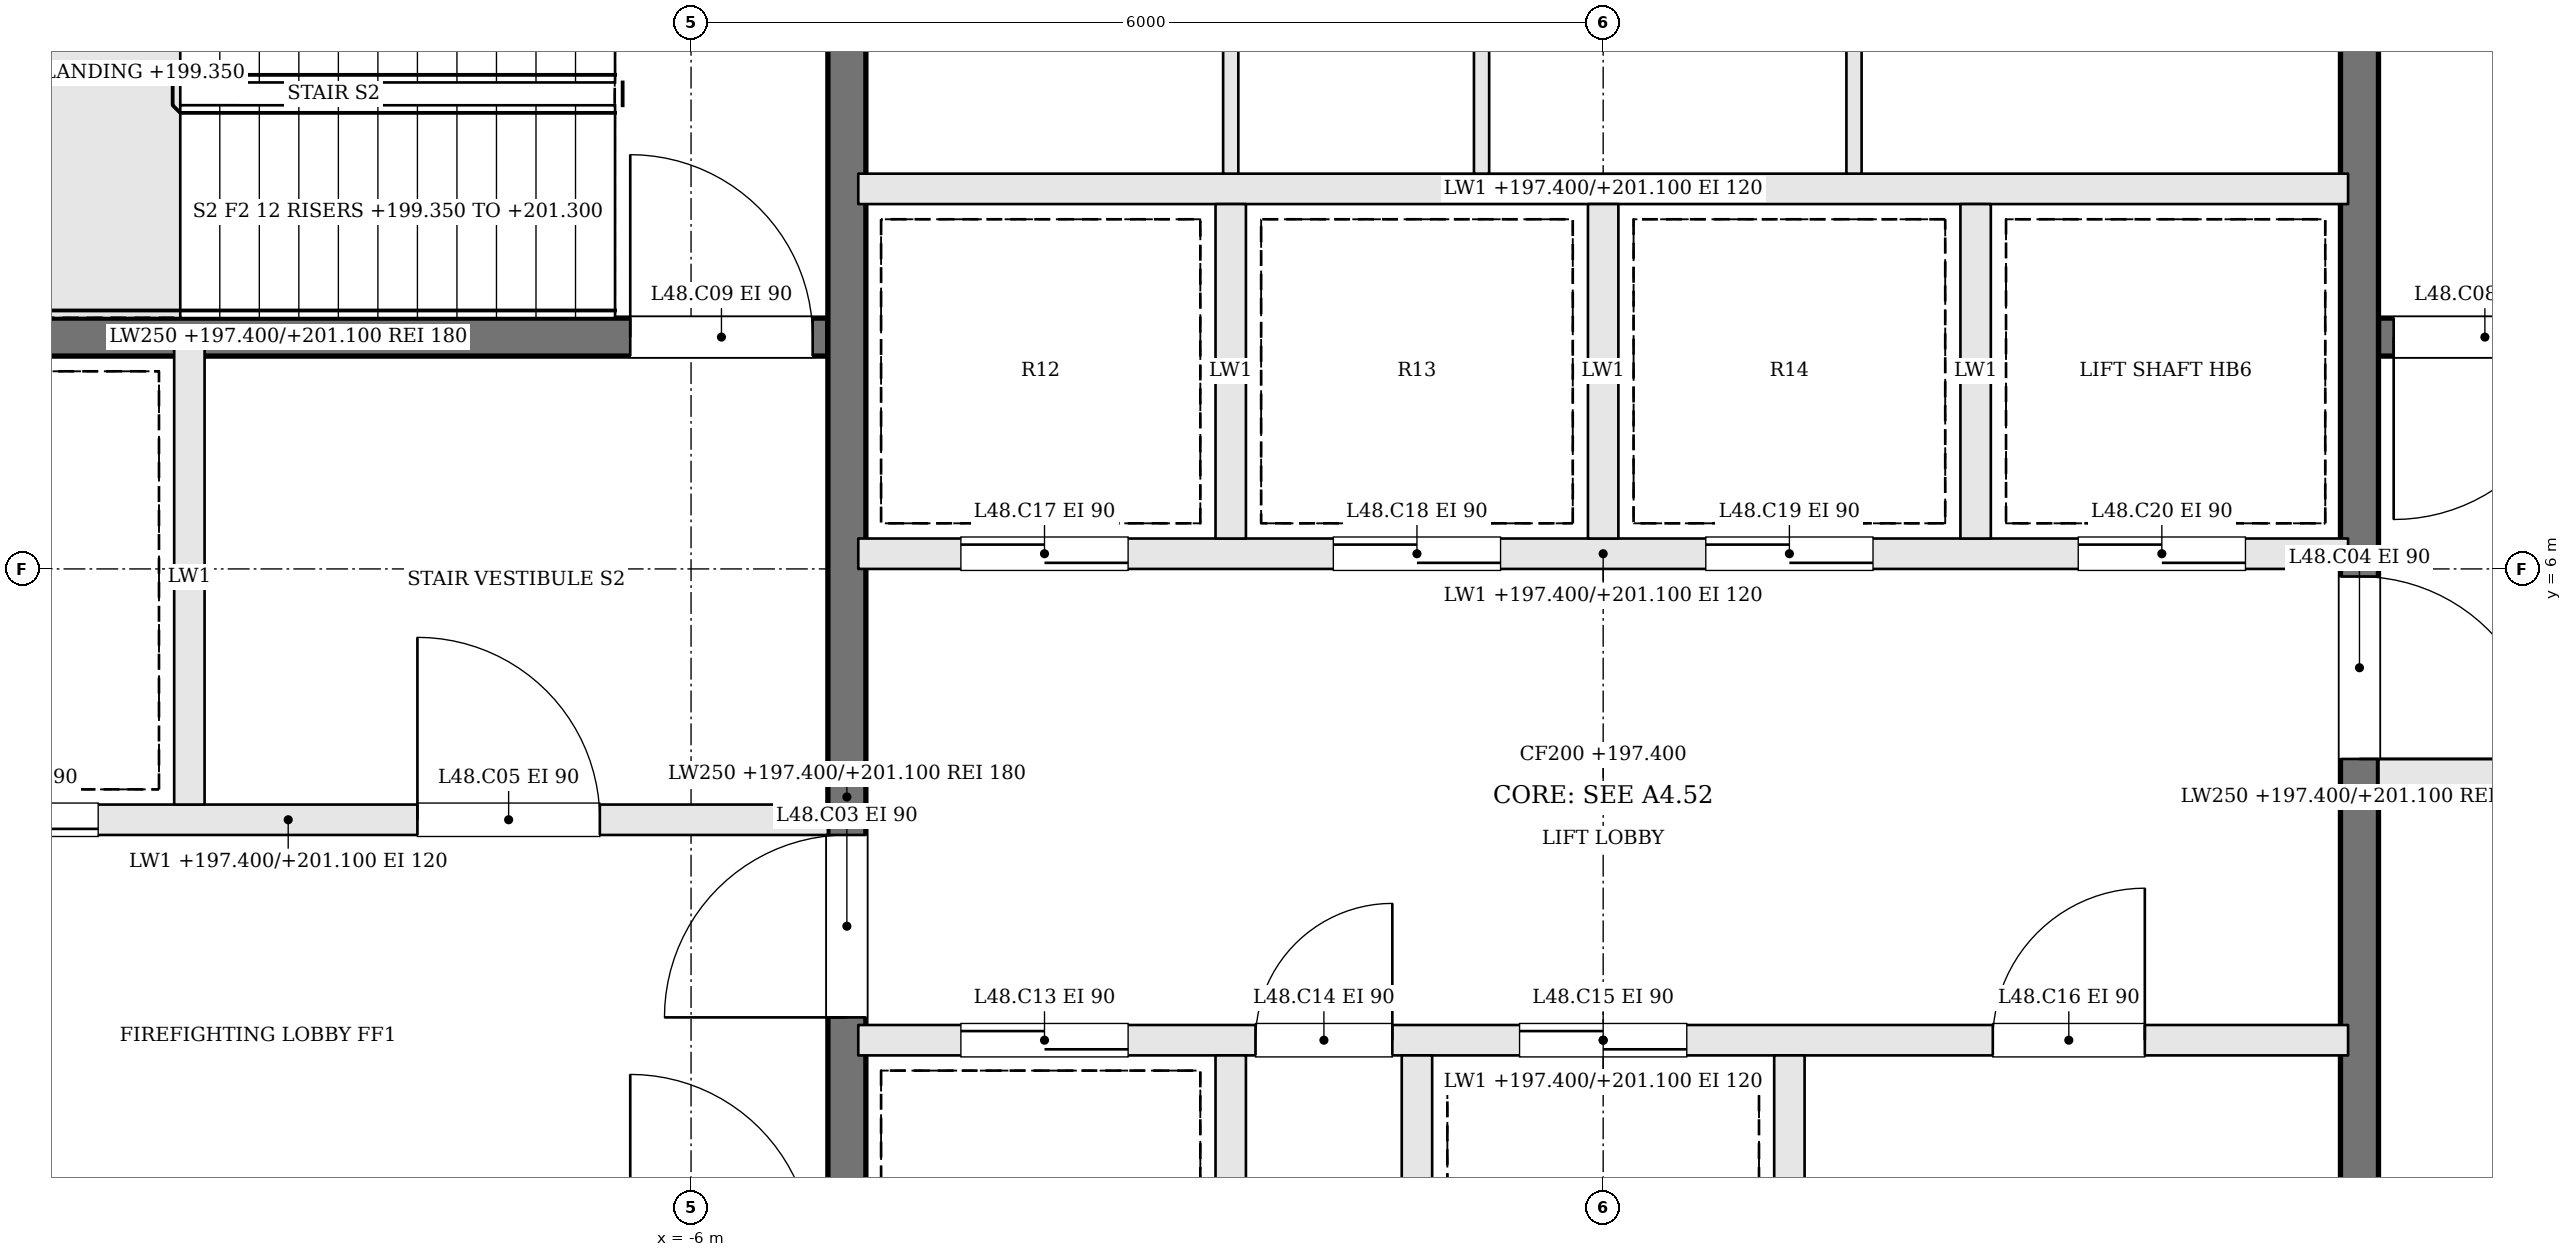
"""IFC4 building model, lengths in metres.
Left out: names, types, materials, properties, quantities, classifications, styles, units other than length and angle.
Written with IfcOpenShell. Run it as: python <this file> out.ifc"""

import sys

from ifc_helpers import new_model, si_unit, direction, frame, frame_2d, origin, place, context, subcontext, project, spatial, rectangle, extrude, element, fill, save


model = new_model("IFC4")
c1 = context("Model", 3, precision=1e-05, world=origin(), true_north=direction((0.0, 1.0)))
c2 = subcontext(c1, "Body", "Model", "MODEL_VIEW")
j1 = project(units=[si_unit("LENGTHUNIT", "METRE"), si_unit("PLANEANGLEUNIT", "RADIAN")], contexts=[c1])
p1 = place(None, origin())
s1 = spatial("IfcSite", under=j1, at=p1, CompositionType="ELEMENT")
p2 = place(p1, origin())
s2 = spatial("IfcBuilding", under=s1, at=p2, CompositionType="ELEMENT")
p3 = place(p2, frame((0.0, 0.0, 197.4)))
s3 = spatial("IfcBuildingStorey", under=s2, at=p3, CompositionType="ELEMENT", Elevation=197.4)
p4 = place(p3, frame((12.2, 7.525, 0.0), z_axis=(0.0, 0.0, 1.0), x_axis=(-1.0, 0.0, 0.0)))
e1 = element("IfcWall", 1, at=p4, inside=s3, PredefinedType="SOLIDWALL", context=c2, shape_type="SweptSolid", body=[
    extrude(rectangle(XDim=7.1, YDim=0.25, at=frame_2d((3.55, 0.0))), origin(), (0.0, 0.0, 1.0), 3.7),
])
p5 = place(p4, frame((5.8, 0.0, 0.0)))
e2 = element("IfcOpeningElement", 2, at=p5, cuts=e1, PredefinedType="OPENING", context=c2, shape_type="SweptSolid", body=[
    extrude(rectangle(XDim=1.2, YDim=2.1, at=frame_2d((0.6, 1.05))), frame((0.0, 0.135, 0.0), z_axis=(0.0, -1.0, 0.0), x_axis=(1.0, 0.0, 0.0)), (0.0, 0.0, 1.0), 0.27),
])
p6 = place(p3, frame((-12.2, 4.35, 0.0), z_axis=(0.0, 0.0, 1.0), x_axis=(1.0, 0.0, 0.0)))
e3 = element("IfcWall", 3, at=p6, inside=s3, PredefinedType="SOLIDWALL", context=c2, shape_type="SweptSolid", body=[
    extrude(rectangle(XDim=7.1, YDim=0.2, at=frame_2d((3.55, 0.0))), origin(), (0.0, 0.0, 1.0), 3.7),
])
p7 = place(p6, frame((4.4, 0.0, 0.0)))
e4 = element("IfcOpeningElement", 4, at=p7, cuts=e3, PredefinedType="OPENING", context=c2, shape_type="SweptSolid", body=[
    extrude(rectangle(XDim=1.2, YDim=2.1, at=frame_2d((0.6, 1.05))), frame((0.0, 0.11, 0.0), z_axis=(0.0, -1.0, 0.0), x_axis=(1.0, 0.0, 0.0)), (0.0, 0.0, 1.0), 0.22),
])
p8 = place(p6, frame((1.1, 0.0, 0.0)))
e5 = element("IfcOpeningElement", 5, at=p8, cuts=e3, PredefinedType="OPENING", context=c2, shape_type="SweptSolid", body=[
    extrude(rectangle(XDim=1.2, YDim=2.1, at=frame_2d((0.6, 1.05))), frame((0.0, 0.11, 0.0), z_axis=(0.0, -1.0, 0.0), x_axis=(1.0, 0.0, 0.0)), (0.0, 0.0, 1.0), 0.22),
])
p9 = place(p3, frame((12.2, 4.65, 0.0), z_axis=(0.0, 0.0, 1.0), x_axis=(-1.0, 0.0, 0.0)))
e6 = element("IfcWall", 6, at=p9, inside=s3, PredefinedType="SOLIDWALL", context=c2, shape_type="SweptSolid", body=[
    extrude(rectangle(XDim=7.1, YDim=0.2, at=frame_2d((3.55, 0.0))), origin(), (0.0, 0.0, 1.0), 3.7),
])
p10 = place(p9, frame((4.4, 0.0, 0.0)))
e7 = element("IfcOpeningElement", 7, at=p10, cuts=e6, PredefinedType="OPENING", context=c2, shape_type="SweptSolid", body=[
    extrude(rectangle(XDim=1.2, YDim=2.1, at=frame_2d((0.6, 1.05))), frame((0.0, 0.11, 0.0), z_axis=(0.0, -1.0, 0.0), x_axis=(1.0, 0.0, 0.0)), (0.0, 0.0, 1.0), 0.22),
])
p11 = place(p9, frame((1.1, 0.0, 0.0)))
e8 = element("IfcOpeningElement", 8, at=p11, cuts=e6, PredefinedType="OPENING", context=c2, shape_type="SweptSolid", body=[
    extrude(rectangle(XDim=1.2, YDim=2.1, at=frame_2d((0.6, 1.05))), frame((0.0, 0.11, 0.0), z_axis=(0.0, -1.0, 0.0), x_axis=(1.0, 0.0, 0.0)), (0.0, 0.0, 1.0), 0.22),
])
p12 = place(p3, frame((-12.2, 7.525, 0.0), z_axis=(0.0, 0.0, 1.0), x_axis=(1.0, 0.0, 0.0)))
e9 = element("IfcWall", 9, at=p12, inside=s3, PredefinedType="SOLIDWALL", context=c2, shape_type="SweptSolid", body=[
    extrude(rectangle(XDim=7.1, YDim=0.25, at=frame_2d((3.55, 0.0))), origin(), (0.0, 0.0, 1.0), 3.7),
])
p13 = place(p12, frame((5.8, 0.0, 0.0)))
e10 = element("IfcOpeningElement", 10, at=p13, cuts=e9, PredefinedType="OPENING", context=c2, shape_type="SweptSolid", body=[
    extrude(rectangle(XDim=1.2, YDim=2.1, at=frame_2d((0.6, 1.05))), frame((0.0, 0.135, 0.0), z_axis=(0.0, -1.0, 0.0), x_axis=(1.0, 0.0, 0.0)), (0.0, 0.0, 1.0), 0.27),
])
p14 = place(p3, frame((-9.3, 4.45, 0.0), z_axis=(0.0, 0.0, 1.0), x_axis=(0.0, 1.0, 0.0)))
e11 = element("IfcWall", 11, at=p14, inside=s3, PredefinedType="SOLIDWALL", context=c2, shape_type="SweptSolid", body=[
    extrude(rectangle(XDim=3.0, YDim=0.2, at=frame_2d((1.5, 0.0))), origin(), (0.0, 0.0, 1.0), 3.7),
])
p15 = place(p3, frame((-4.975, -2.2, 0.0), z_axis=(0.0, 0.0, 1.0), x_axis=(0.0, 1.0, 0.0)))
e12 = element("IfcWall", 12, at=p15, inside=s3, PredefinedType="SOLIDWALL", context=c2, shape_type="SweptSolid", body=[
    extrude(rectangle(XDim=13.4, YDim=0.25, at=frame_2d((6.7, 0.0))), origin(), (0.0, 0.0, 1.0), 3.7),
])
p16 = place(p15, frame((5.25, 0.0, 0.0)))
e13 = element("IfcOpeningElement", 13, at=p16, cuts=e12, PredefinedType="OPENING", context=c2, shape_type="SweptSolid", body=[
    extrude(rectangle(XDim=1.2, YDim=2.1, at=frame_2d((0.6, 1.05))), frame((0.0, 0.135, 0.0), z_axis=(0.0, -1.0, 0.0), x_axis=(1.0, 0.0, 0.0)), (0.0, 0.0, 1.0), 0.27),
])
p17 = place(p3, frame((4.975, 11.2, 0.0), z_axis=(0.0, 0.0, 1.0), x_axis=(0.0, -1.0, 0.0)))
e14 = element("IfcWall", 14, at=p17, inside=s3, PredefinedType="SOLIDWALL", context=c2, shape_type="SweptSolid", body=[
    extrude(rectangle(XDim=13.4, YDim=0.25, at=frame_2d((6.7, 0.0))), origin(), (0.0, 0.0, 1.0), 3.7),
])
p18 = place(p17, frame((5.25, 0.0, 0.0)))
e15 = element("IfcOpeningElement", 15, at=p18, cuts=e14, PredefinedType="OPENING", context=c2, shape_type="SweptSolid", body=[
    extrude(rectangle(XDim=1.2, YDim=2.1, at=frame_2d((0.6, 1.05))), frame((0.0, 0.135, 0.0), z_axis=(0.0, -1.0, 0.0), x_axis=(1.0, 0.0, 0.0)), (0.0, 0.0, 1.0), 0.27),
])
p19 = place(p3, frame((-4.9, 2.9, 0.0), z_axis=(0.0, 0.0, 1.0), x_axis=(1.0, 0.0, 0.0)))
e16 = element("IfcWall", 16, at=p19, inside=s3, PredefinedType="SOLIDWALL", context=c2, shape_type="SweptSolid", body=[
    extrude(rectangle(XDim=9.8, YDim=0.2, at=frame_2d((4.9, 0.0))), origin(), (0.0, 0.0, 1.0), 3.7),
])
p20 = place(p19, frame((0.675, 0.0, 0.0)))
e17 = element("IfcOpeningElement", 17, at=p20, cuts=e16, PredefinedType="OPENING", context=c2, shape_type="SweptSolid", body=[
    extrude(rectangle(XDim=1.1, YDim=2.1, at=frame_2d((0.55, 1.05))), frame((0.0, 0.11, 0.0), z_axis=(0.0, -1.0, 0.0), x_axis=(1.0, 0.0, 0.0)), (0.0, 0.0, 1.0), 0.22),
])
p21 = place(p19, frame((2.613, 0.0, 0.0)))
e18 = element("IfcOpeningElement", 18, at=p21, cuts=e16, PredefinedType="OPENING", context=c2, shape_type="SweptSolid", body=[
    extrude(rectangle(XDim=0.9, YDim=2.1, at=frame_2d((0.45, 1.05))), frame((0.0, 0.11, 0.0), z_axis=(0.0, -1.0, 0.0), x_axis=(1.0, 0.0, 0.0)), (0.0, 0.0, 1.0), 0.22),
])
p22 = place(p19, frame((4.35, 0.0, 0.0)))
e19 = element("IfcOpeningElement", 19, at=p22, cuts=e16, PredefinedType="OPENING", context=c2, shape_type="SweptSolid", body=[
    extrude(rectangle(XDim=1.1, YDim=2.1, at=frame_2d((0.55, 1.05))), frame((0.0, 0.11, 0.0), z_axis=(0.0, -1.0, 0.0), x_axis=(1.0, 0.0, 0.0)), (0.0, 0.0, 1.0), 0.22),
])
p23 = place(p19, frame((7.463, 0.0, 0.0)))
e20 = element("IfcOpeningElement", 20, at=p23, cuts=e16, PredefinedType="OPENING", context=c2, shape_type="SweptSolid", body=[
    extrude(rectangle(XDim=1.0, YDim=2.1, at=frame_2d((0.5, 1.05))), frame((0.0, 0.11, 0.0), z_axis=(0.0, -1.0, 0.0), x_axis=(1.0, 0.0, 0.0)), (0.0, 0.0, 1.0), 0.22),
])
p24 = place(p3, frame((-4.9, 6.1, 0.0), z_axis=(0.0, 0.0, 1.0), x_axis=(1.0, 0.0, 0.0)))
e21 = element("IfcWall", 21, at=p24, inside=s3, PredefinedType="SOLIDWALL", context=c2, shape_type="SweptSolid", body=[
    extrude(rectangle(XDim=9.8, YDim=0.2, at=frame_2d((4.9, 0.0))), origin(), (0.0, 0.0, 1.0), 3.7),
])
p25 = place(p24, frame((0.675, 0.0, 0.0)))
e22 = element("IfcOpeningElement", 22, at=p25, cuts=e21, PredefinedType="OPENING", context=c2, shape_type="SweptSolid", body=[
    extrude(rectangle(XDim=1.1, YDim=2.1, at=frame_2d((0.55, 1.05))), frame((0.0, 0.11, 0.0), z_axis=(0.0, -1.0, 0.0), x_axis=(1.0, 0.0, 0.0)), (0.0, 0.0, 1.0), 0.22),
])
p26 = place(p24, frame((3.125, 0.0, 0.0)))
e23 = element("IfcOpeningElement", 23, at=p26, cuts=e21, PredefinedType="OPENING", context=c2, shape_type="SweptSolid", body=[
    extrude(rectangle(XDim=1.1, YDim=2.1, at=frame_2d((0.55, 1.05))), frame((0.0, 0.11, 0.0), z_axis=(0.0, -1.0, 0.0), x_axis=(1.0, 0.0, 0.0)), (0.0, 0.0, 1.0), 0.22),
])
p27 = place(p24, frame((5.575, 0.0, 0.0)))
e24 = element("IfcOpeningElement", 24, at=p27, cuts=e21, PredefinedType="OPENING", context=c2, shape_type="SweptSolid", body=[
    extrude(rectangle(XDim=1.1, YDim=2.1, at=frame_2d((0.55, 1.05))), frame((0.0, 0.11, 0.0), z_axis=(0.0, -1.0, 0.0), x_axis=(1.0, 0.0, 0.0)), (0.0, 0.0, 1.0), 0.22),
])
p28 = place(p24, frame((8.025, 0.0, 0.0)))
e25 = element("IfcOpeningElement", 25, at=p28, cuts=e21, PredefinedType="OPENING", context=c2, shape_type="SweptSolid", body=[
    extrude(rectangle(XDim=1.1, YDim=2.1, at=frame_2d((0.55, 1.05))), frame((0.0, 0.11, 0.0), z_axis=(0.0, -1.0, 0.0), x_axis=(1.0, 0.0, 0.0)), (0.0, 0.0, 1.0), 0.22),
])
p29 = place(p3, frame((-4.9, 8.5, 0.0), z_axis=(0.0, 0.0, 1.0), x_axis=(1.0, 0.0, 0.0)))
e26 = element("IfcWall", 26, at=p29, inside=s3, PredefinedType="SOLIDWALL", context=c2, shape_type="SweptSolid", body=[
    extrude(rectangle(XDim=9.8, YDim=0.2, at=frame_2d((4.9, 0.0))), origin(), (0.0, 0.0, 1.0), 3.7),
])
for number, where, z_axis, x_axis in (
    (27, (-2.45, 0.6, 0.0), (0.0, 0.0, 1.0), (0.0, 1.0, 0.0)),
    (28, (-1.225, 0.6, 0.0), (0.0, 0.0, 1.0), (0.0, 1.0, 0.0)),
    (29, (1.225, 0.6, 0.0), (0.0, 0.0, 1.0), (0.0, 1.0, 0.0)),
    (30, (-2.45, 6.2, 0.0), (0.0, 0.0, 1.0), (0.0, 1.0, 0.0)),
    (31, (0.0, 6.2, 0.0), (0.0, 0.0, 1.0), (0.0, 1.0, 0.0)),
    (32, (2.45, 6.2, 0.0), (0.0, 0.0, 1.0), (0.0, 1.0, 0.0)),
):
    element("IfcWall", number, at=place(p3, frame(where, z_axis=z_axis, x_axis=x_axis)), inside=s3, PredefinedType="SOLIDWALL", context=c2, shape_type="SweptSolid", body=[
        extrude(rectangle(XDim=2.2, YDim=0.2, at=frame_2d((1.1, 0.0))), origin(), (0.0, 0.0, 1.0), 3.7),
    ])
for number, where, z_axis, x_axis in (
    (33, (-2.45, 8.6, 0.0), (0.0, 0.0, 1.0), (0.0, 1.0, 0.0)),
    (34, (-0.8, 8.6, 0.0), (0.0, 0.0, 1.0), (0.0, 1.0, 0.0)),
    (35, (1.65, 8.6, 0.0), (0.0, 0.0, 1.0), (0.0, 1.0, 0.0)),
):
    element("IfcWall", number, at=place(p3, frame(where, z_axis=z_axis, x_axis=x_axis)), inside=s3, PredefinedType="PARTITIONING", context=c2, shape_type="SweptSolid", body=[
        extrude(rectangle(XDim=2.6, YDim=0.1, at=frame_2d((1.3, 0.0))), origin(), (0.0, 0.0, 1.0), 3.7),
    ])
p30 = place(p16, origin())
e36 = element("IfcDoor", 36, at=p30, inside=s3, OperationType="SINGLE_SWING_LEFT", PredefinedType="DOOR", context=c2, shape_type="SweptSolid", body=[
    extrude(rectangle(XDim=1.2, YDim=2.1, at=frame_2d((0.6, 1.05))), frame((0.0, 0.025, 0.0), z_axis=(0.0, -1.0, 0.0), x_axis=(1.0, 0.0, 0.0)), (0.0, 0.0, 1.0), 0.05),
])
fill(e13, e36)
p31 = place(p18, origin())
e37 = element("IfcDoor", 37, at=p31, inside=s3, OperationType="SINGLE_SWING_RIGHT", PredefinedType="DOOR", context=c2, shape_type="SweptSolid", body=[
    extrude(rectangle(XDim=1.2, YDim=2.1, at=frame_2d((0.6, 1.05))), frame((0.0, 0.025, 0.0), z_axis=(0.0, -1.0, 0.0), x_axis=(1.0, 0.0, 0.0)), (0.0, 0.0, 1.0), 0.05),
])
fill(e15, e37)
p32 = place(p7, origin())
e38 = element("IfcDoor", 38, at=p32, inside=s3, OperationType="SINGLE_SWING_LEFT", PredefinedType="DOOR", context=c2, shape_type="SweptSolid", body=[
    extrude(rectangle(XDim=1.2, YDim=2.1, at=frame_2d((0.6, 1.05))), frame((0.0, 0.025, 0.0), z_axis=(0.0, -1.0, 0.0), x_axis=(1.0, 0.0, 0.0)), (0.0, 0.0, 1.0), 0.05),
])
fill(e4, e38)
p33 = place(p5, origin())
e39 = element("IfcDoor", 39, at=p33, inside=s3, OperationType="SINGLE_SWING_RIGHT", PredefinedType="DOOR", context=c2, shape_type="SweptSolid", body=[
    extrude(rectangle(XDim=1.2, YDim=2.1, at=frame_2d((0.6, 1.05))), frame((0.0, 0.025, 0.0), z_axis=(0.0, -1.0, 0.0), x_axis=(1.0, 0.0, 0.0)), (0.0, 0.0, 1.0), 0.05),
])
fill(e2, e39)
p34 = place(p13, origin())
e40 = element("IfcDoor", 40, at=p34, inside=s3, OperationType="SINGLE_SWING_LEFT", PredefinedType="DOOR", context=c2, shape_type="SweptSolid", body=[
    extrude(rectangle(XDim=1.2, YDim=2.1, at=frame_2d((0.6, 1.05))), frame((0.0, 0.025, 0.0), z_axis=(0.0, -1.0, 0.0), x_axis=(1.0, 0.0, 0.0)), (0.0, 0.0, 1.0), 0.05),
])
fill(e10, e40)
p35 = place(p8, origin())
e41 = element("IfcDoor", 41, at=p35, inside=s3, OperationType="SLIDING_TO_RIGHT", PredefinedType="DOOR", context=c2, shape_type="SweptSolid", body=[
    extrude(rectangle(XDim=1.2, YDim=2.1, at=frame_2d((0.6, 1.05))), frame((0.0, 0.025, 0.0), z_axis=(0.0, -1.0, 0.0), x_axis=(1.0, 0.0, 0.0)), (0.0, 0.0, 1.0), 0.05),
])
fill(e5, e41)
p36 = place(p20, origin())
e42 = element("IfcDoor", 42, at=p36, inside=s3, OperationType="SLIDING_TO_RIGHT", PredefinedType="DOOR", context=c2, shape_type="SweptSolid", body=[
    extrude(rectangle(XDim=1.1, YDim=2.1, at=frame_2d((0.55, 1.05))), frame((0.0, 0.025, 0.0), z_axis=(0.0, -1.0, 0.0), x_axis=(1.0, 0.0, 0.0)), (0.0, 0.0, 1.0), 0.05),
])
fill(e17, e42)
p37 = place(p21, origin())
e43 = element("IfcDoor", 43, at=p37, inside=s3, OperationType="SINGLE_SWING_RIGHT", PredefinedType="DOOR", context=c2, shape_type="SweptSolid", body=[
    extrude(rectangle(XDim=0.9, YDim=2.1, at=frame_2d((0.45, 1.05))), frame((0.0, 0.025, 0.0), z_axis=(0.0, -1.0, 0.0), x_axis=(1.0, 0.0, 0.0)), (0.0, 0.0, 1.0), 0.05),
])
fill(e18, e43)
p38 = place(p22, origin())
e44 = element("IfcDoor", 44, at=p38, inside=s3, OperationType="SLIDING_TO_LEFT", PredefinedType="DOOR", context=c2, shape_type="SweptSolid", body=[
    extrude(rectangle(XDim=1.1, YDim=2.1, at=frame_2d((0.55, 1.05))), frame((0.0, 0.025, 0.0), z_axis=(0.0, -1.0, 0.0), x_axis=(1.0, 0.0, 0.0)), (0.0, 0.0, 1.0), 0.05),
])
fill(e19, e44)
p39 = place(p23, origin())
e45 = element("IfcDoor", 45, at=p39, inside=s3, OperationType="SINGLE_SWING_RIGHT", PredefinedType="DOOR", context=c2, shape_type="SweptSolid", body=[
    extrude(rectangle(XDim=1.0, YDim=2.1, at=frame_2d((0.5, 1.05))), frame((0.0, 0.025, 0.0), z_axis=(0.0, -1.0, 0.0), x_axis=(1.0, 0.0, 0.0)), (0.0, 0.0, 1.0), 0.05),
])
fill(e20, e45)
p40 = place(p25, origin())
e46 = element("IfcDoor", 46, at=p40, inside=s3, OperationType="SLIDING_TO_RIGHT", PredefinedType="DOOR", context=c2, shape_type="SweptSolid", body=[
    extrude(rectangle(XDim=1.1, YDim=2.1, at=frame_2d((0.55, 1.05))), frame((0.0, 0.025, 0.0), z_axis=(0.0, -1.0, 0.0), x_axis=(1.0, 0.0, 0.0)), (0.0, 0.0, 1.0), 0.05),
])
fill(e22, e46)
p41 = place(p26, origin())
e47 = element("IfcDoor", 47, at=p41, inside=s3, OperationType="SLIDING_TO_LEFT", PredefinedType="DOOR", context=c2, shape_type="SweptSolid", body=[
    extrude(rectangle(XDim=1.1, YDim=2.1, at=frame_2d((0.55, 1.05))), frame((0.0, 0.025, 0.0), z_axis=(0.0, -1.0, 0.0), x_axis=(1.0, 0.0, 0.0)), (0.0, 0.0, 1.0), 0.05),
])
fill(e23, e47)
p42 = place(p27, origin())
e48 = element("IfcDoor", 48, at=p42, inside=s3, OperationType="SLIDING_TO_RIGHT", PredefinedType="DOOR", context=c2, shape_type="SweptSolid", body=[
    extrude(rectangle(XDim=1.1, YDim=2.1, at=frame_2d((0.55, 1.05))), frame((0.0, 0.025, 0.0), z_axis=(0.0, -1.0, 0.0), x_axis=(1.0, 0.0, 0.0)), (0.0, 0.0, 1.0), 0.05),
])
fill(e24, e48)
p43 = place(p28, origin())
e49 = element("IfcDoor", 49, at=p43, inside=s3, OperationType="SLIDING_TO_LEFT", PredefinedType="DOOR", context=c2, shape_type="SweptSolid", body=[
    extrude(rectangle(XDim=1.1, YDim=2.1, at=frame_2d((0.55, 1.05))), frame((0.0, 0.025, 0.0), z_axis=(0.0, -1.0, 0.0), x_axis=(1.0, 0.0, 0.0)), (0.0, 0.0, 1.0), 0.05),
])
fill(e25, e49)
save(model, sys.argv[1])
